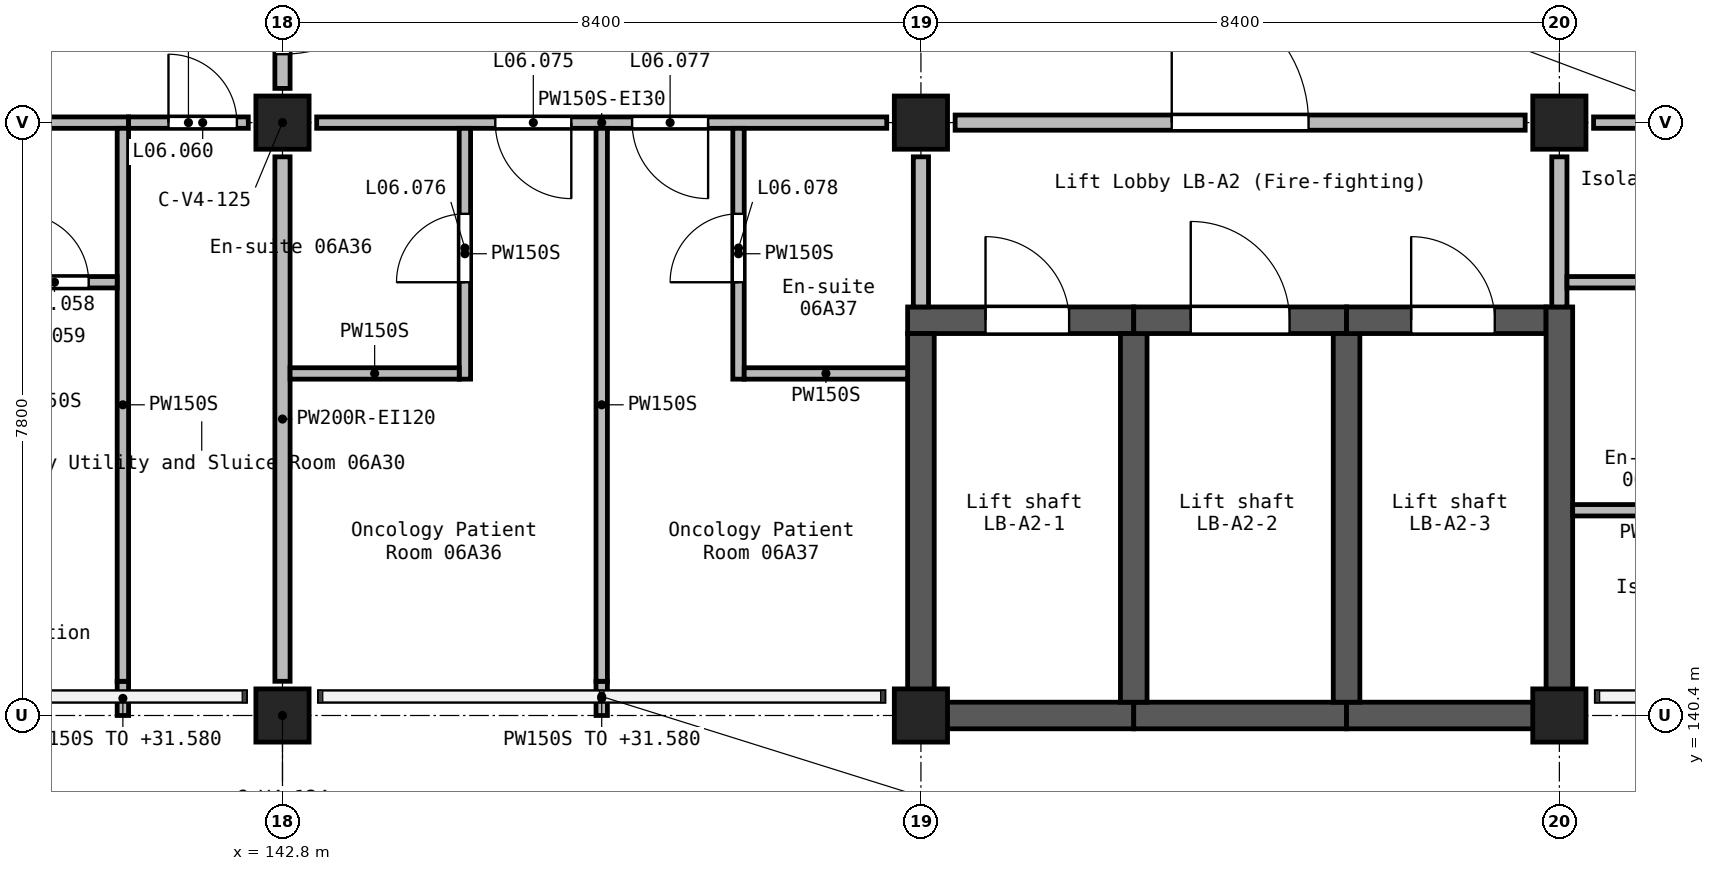
"""IFC4 building model, lengths in metres.
Left out: names, types, materials, properties, quantities, classifications, styles, units other than length and angle.
Written with IfcOpenShell. Run it as: python <this file> out.ifc"""

import sys

from ifc_helpers import new_model, si_unit, direction, frame, frame_2d, origin, origin_2d, place, context, subcontext, project, spatial, rectangle, extrude, element, fill, save


model = new_model("IFC4")
c1 = context("Model", 3, precision=1e-05, world=origin(), true_north=direction((0.0, 1.0)))
c2 = subcontext(c1, "Body", "Model", "MODEL_VIEW")
j1 = project(units=[si_unit("LENGTHUNIT", "METRE"), si_unit("PLANEANGLEUNIT", "RADIAN")], contexts=[c1])
p1 = place(None, origin())
s1 = spatial("IfcSite", under=j1, at=p1, CompositionType="ELEMENT")
p2 = place(p1, origin())
s2 = spatial("IfcBuilding", under=s1, at=p2, CompositionType="ELEMENT")
p3 = place(p2, frame((0.0, 0.0, 28.8)))
s3 = spatial("IfcBuildingStorey", under=s2, at=p3, CompositionType="ELEMENT", Elevation=28.8)
for number, where, z_axis, x_axis in (
    (1, (142.8, 140.4, 0.0), (0.0, 0.0, 1.0), (1.0, 0.0, 0.0)),
    (2, (142.8, 148.2, 0.0), (0.0, 0.0, 1.0), (1.0, 0.0, 0.0)),
    (3, (151.2, 140.4, 0.0), (0.0, 0.0, 1.0), (1.0, 0.0, 0.0)),
    (4, (151.2, 148.2, 0.0), (0.0, 0.0, 1.0), (1.0, 0.0, 0.0)),
    (5, (159.6, 140.4, 0.0), (0.0, 0.0, 1.0), (1.0, 0.0, 0.0)),
    (6, (159.6, 148.2, 0.0), (0.0, 0.0, 1.0), (1.0, 0.0, 0.0)),
):
    element("IfcColumn", number, at=place(p3, frame(where, z_axis=z_axis, x_axis=x_axis)), inside=s3, PredefinedType="COLUMN", context=c2, shape_type="SweptSolid", body=[
        extrude(rectangle(XDim=0.7, YDim=0.7, at=origin_2d()), origin(), (0.0, 0.0, 1.0), 3.9),
    ])
p4 = place(p3, frame((151.025, 145.6, 0.0), z_axis=(0.0, 0.0, 1.0), x_axis=(1.0, 0.0, 0.0)))
e7 = element("IfcWall", 7, at=p4, inside=s3, PredefinedType="SHEAR", context=c2, shape_type="SweptSolid", body=[
    extrude(rectangle(XDim=2.975, YDim=0.35, at=frame_2d((1.488, 0.0))), origin(), (0.0, 0.0, 1.0), 3.9),
])
p5 = place(p4, frame((1.025, 0.0, 0.0)))
e8 = element("IfcOpeningElement", 8, at=p5, cuts=e7, PredefinedType="OPENING", context=c2, shape_type="SweptSolid", body=[
    extrude(rectangle(XDim=1.1, YDim=2.1, at=frame_2d((0.55, 1.05))), frame((0.0, 0.185, 0.0), z_axis=(0.0, -1.0, 0.0), x_axis=(1.0, 0.0, 0.0)), (0.0, 0.0, 1.0), 0.37),
])
p6 = place(p3, frame((151.2, 140.225, 0.0), z_axis=(0.0, 0.0, 1.0), x_axis=(0.0, 1.0, 0.0)))
e9 = element("IfcWall", 9, at=p6, inside=s3, PredefinedType="SHEAR", context=c2, shape_type="SweptSolid", body=[
    extrude(rectangle(XDim=5.2, YDim=0.35, at=frame_2d((2.6, 0.0))), origin(), (0.0, 0.0, 1.0), 3.9),
])
p7 = place(p3, frame((151.375, 140.4, 0.0), z_axis=(0.0, 0.0, 1.0), x_axis=(1.0, 0.0, 0.0)))
e10 = element("IfcWall", 10, at=p7, inside=s3, PredefinedType="SHEAR", context=c2, shape_type="SweptSolid", body=[
    extrude(rectangle(XDim=2.625, YDim=0.35, at=frame_2d((1.312, 0.0))), origin(), (0.0, 0.0, 1.0), 3.9),
])
p8 = place(p3, frame((154.0, 140.4, 0.0), z_axis=(0.0, 0.0, 1.0), x_axis=(1.0, 0.0, 0.0)))
e11 = element("IfcWall", 11, at=p8, inside=s3, PredefinedType="SHEAR", context=c2, shape_type="SweptSolid", body=[
    extrude(rectangle(XDim=2.8, YDim=0.35, at=frame_2d((1.4, 0.0))), origin(), (0.0, 0.0, 1.0), 3.9),
])
p9 = place(p3, frame((154.0, 140.575, 0.0), z_axis=(0.0, 0.0, 1.0), x_axis=(0.0, 1.0, 0.0)))
e12 = element("IfcWall", 12, at=p9, inside=s3, PredefinedType="SHEAR", context=c2, shape_type="SweptSolid", body=[
    extrude(rectangle(XDim=4.85, YDim=0.35, at=frame_2d((2.425, 0.0))), origin(), (0.0, 0.0, 1.0), 3.9),
])
p10 = place(p3, frame((154.0, 145.6, 0.0), z_axis=(0.0, 0.0, 1.0), x_axis=(1.0, 0.0, 0.0)))
e13 = element("IfcWall", 13, at=p10, inside=s3, PredefinedType="SHEAR", context=c2, shape_type="SweptSolid", body=[
    extrude(rectangle(XDim=2.8, YDim=0.35, at=frame_2d((1.4, 0.0))), origin(), (0.0, 0.0, 1.0), 3.9),
])
p11 = place(p10, frame((0.75, 0.0, 0.0)))
e14 = element("IfcOpeningElement", 14, at=p11, cuts=e13, PredefinedType="OPENING", context=c2, shape_type="SweptSolid", body=[
    extrude(rectangle(XDim=1.3, YDim=2.1, at=frame_2d((0.65, 1.05))), frame((0.0, 0.185, 0.0), z_axis=(0.0, -1.0, 0.0), x_axis=(1.0, 0.0, 0.0)), (0.0, 0.0, 1.0), 0.37),
])
p12 = place(p3, frame((156.8, 140.4, 0.0), z_axis=(0.0, 0.0, 1.0), x_axis=(1.0, 0.0, 0.0)))
e15 = element("IfcWall", 15, at=p12, inside=s3, PredefinedType="SHEAR", context=c2, shape_type="SweptSolid", body=[
    extrude(rectangle(XDim=2.625, YDim=0.35, at=frame_2d((1.312, 0.0))), origin(), (0.0, 0.0, 1.0), 3.9),
])
p13 = place(p3, frame((156.8, 140.575, 0.0), z_axis=(0.0, 0.0, 1.0), x_axis=(0.0, 1.0, 0.0)))
e16 = element("IfcWall", 16, at=p13, inside=s3, PredefinedType="SHEAR", context=c2, shape_type="SweptSolid", body=[
    extrude(rectangle(XDim=4.85, YDim=0.35, at=frame_2d((2.425, 0.0))), origin(), (0.0, 0.0, 1.0), 3.9),
])
p14 = place(p3, frame((156.8, 145.6, 0.0), z_axis=(0.0, 0.0, 1.0), x_axis=(1.0, 0.0, 0.0)))
e17 = element("IfcWall", 17, at=p14, inside=s3, PredefinedType="SHEAR", context=c2, shape_type="SweptSolid", body=[
    extrude(rectangle(XDim=2.625, YDim=0.35, at=frame_2d((1.312, 0.0))), origin(), (0.0, 0.0, 1.0), 3.9),
])
p15 = place(p14, frame((0.85, 0.0, 0.0)))
e18 = element("IfcOpeningElement", 18, at=p15, cuts=e17, PredefinedType="OPENING", context=c2, shape_type="SweptSolid", body=[
    extrude(rectangle(XDim=1.1, YDim=2.1, at=frame_2d((0.55, 1.05))), frame((0.0, 0.185, 0.0), z_axis=(0.0, -1.0, 0.0), x_axis=(1.0, 0.0, 0.0)), (0.0, 0.0, 1.0), 0.37),
])
p16 = place(p3, frame((159.6, 140.225, 0.0), z_axis=(0.0, 0.0, 1.0), x_axis=(0.0, 1.0, 0.0)))
e19 = element("IfcWall", 19, at=p16, inside=s3, PredefinedType="SHEAR", context=c2, shape_type="SweptSolid", body=[
    extrude(rectangle(XDim=5.55, YDim=0.35, at=frame_2d((2.775, 0.0))), origin(), (0.0, 0.0, 1.0), 3.9),
])
p17 = place(p3, frame((142.8, 151.35, 0.0), z_axis=(0.0, 0.0, 1.0), x_axis=(0.0, -1.0, 0.0)))
e20 = element("IfcWall", 20, at=p17, inside=s3, PredefinedType="SOLIDWALL", context=c2, shape_type="SweptSolid", body=[
    extrude(rectangle(XDim=2.7, YDim=0.2, at=frame_2d((1.35, 0.0))), origin(), (0.0, 0.0, 1.0), 3.6),
])
p18 = place(p17, frame((0.45, 0.0, 0.0)))
e21 = element("IfcOpeningElement", 21, at=p18, cuts=e20, PredefinedType="OPENING", context=c2, shape_type="SweptSolid", body=[
    extrude(rectangle(XDim=1.8, YDim=2.1, at=frame_2d((0.9, 1.05))), frame((0.0, 0.11, 0.0), z_axis=(0.0, -1.0, 0.0), x_axis=(1.0, 0.0, 0.0)), (0.0, 0.0, 1.0), 0.22),
])
p19 = place(p3, frame((142.8, 147.75, 0.0), z_axis=(0.0, 0.0, 1.0), x_axis=(0.0, -1.0, 0.0)))
e22 = element("IfcWall", 22, at=p19, inside=s3, PredefinedType="SOLIDWALL", context=c2, shape_type="SweptSolid", body=[
    extrude(rectangle(XDim=6.9, YDim=0.2, at=frame_2d((3.45, 0.0))), origin(), (0.0, 0.0, 1.0), 3.6),
])
p20 = place(p3, frame((151.65, 148.2, 0.0), z_axis=(0.0, 0.0, 1.0), x_axis=(1.0, 0.0, 0.0)))
e23 = element("IfcWall", 23, at=p20, inside=s3, PredefinedType="SOLIDWALL", context=c2, shape_type="SweptSolid", body=[
    extrude(rectangle(XDim=7.5, YDim=0.2, at=frame_2d((3.75, 0.0))), origin(), (0.0, 0.0, 1.0), 3.6),
])
p21 = place(p20, frame((2.85, 0.0, 0.0)))
e24 = element("IfcOpeningElement", 24, at=p21, cuts=e23, PredefinedType="OPENING", context=c2, shape_type="SweptSolid", body=[
    extrude(rectangle(XDim=1.8, YDim=2.1, at=frame_2d((0.9, 1.05))), frame((0.0, 0.11, 0.0), z_axis=(0.0, -1.0, 0.0), x_axis=(1.0, 0.0, 0.0)), (0.0, 0.0, 1.0), 0.22),
])
for number, where, z_axis, x_axis in (
    (25, (151.2, 145.775, 0.0), (0.0, 0.0, 1.0), (0.0, 1.0, 0.0)),
    (26, (159.6, 145.775, 0.0), (0.0, 0.0, 1.0), (0.0, 1.0, 0.0)),
):
    element("IfcWall", number, at=place(p3, frame(where, z_axis=z_axis, x_axis=x_axis)), inside=s3, PredefinedType="SOLIDWALL", context=c2, shape_type="SweptSolid", body=[
        extrude(rectangle(XDim=1.975, YDim=0.2, at=frame_2d((0.988, 0.0))), origin(), (0.0, 0.0, 1.0), 3.6),
    ])
p22 = place(p3, frame((150.75, 148.2, 0.0), z_axis=(0.0, 0.0, 1.0), x_axis=(-1.0, 0.0, 0.0)))
e27 = element("IfcWall", 27, at=p22, inside=s3, PredefinedType="PARTITIONING", context=c2, shape_type="SweptSolid", body=[
    extrude(rectangle(XDim=7.5, YDim=0.15, at=frame_2d((3.75, 0.0))), origin(), (0.0, 0.0, 1.0), 3.6),
])
p23 = place(p22, frame((4.15, 0.0, 0.0)))
e28 = element("IfcOpeningElement", 28, at=p23, cuts=e27, PredefinedType="OPENING", context=c2, shape_type="SweptSolid", body=[
    extrude(rectangle(XDim=1.0, YDim=2.1, at=frame_2d((0.5, 1.05))), frame((0.0, 0.085, 0.0), z_axis=(0.0, -1.0, 0.0), x_axis=(1.0, 0.0, 0.0)), (0.0, 0.0, 1.0), 0.17),
])
p24 = place(p22, frame((2.35, 0.0, 0.0)))
e29 = element("IfcOpeningElement", 29, at=p24, cuts=e27, PredefinedType="OPENING", context=c2, shape_type="SweptSolid", body=[
    extrude(rectangle(XDim=1.0, YDim=2.1, at=frame_2d((0.5, 1.05))), frame((0.0, 0.085, 0.0), z_axis=(0.0, -1.0, 0.0), x_axis=(1.0, 0.0, 0.0)), (0.0, 0.0, 1.0), 0.17),
])
p25 = place(p3, frame((160.05, 148.2, 0.0), z_axis=(0.0, 0.0, 1.0), x_axis=(1.0, 0.0, 0.0)))
e30 = element("IfcWall", 30, at=p25, inside=s3, PredefinedType="PARTITIONING", context=c2, shape_type="SweptSolid", body=[
    extrude(rectangle(XDim=3.825, YDim=0.15, at=frame_2d((1.913, 0.0))), origin(), (0.0, 0.0, 1.0), 3.6),
])
p26 = place(p25, frame((1.2, 0.0, 0.0)))
e31 = element("IfcOpeningElement", 31, at=p26, cuts=e30, PredefinedType="OPENING", context=c2, shape_type="SweptSolid", body=[
    extrude(rectangle(XDim=0.9, YDim=2.1, at=frame_2d((0.45, 1.05))), frame((0.0, 0.085, 0.0), z_axis=(0.0, -1.0, 0.0), x_axis=(1.0, 0.0, 0.0)), (0.0, 0.0, 1.0), 0.17),
])
p27 = place(p3, frame((136.575, 148.2, 0.0), z_axis=(0.0, 0.0, 1.0), x_axis=(1.0, 0.0, 0.0)))
e32 = element("IfcWall", 32, at=p27, inside=s3, PredefinedType="PARTITIONING", context=c2, shape_type="SweptSolid", body=[
    extrude(rectangle(XDim=4.2, YDim=0.15, at=frame_2d((2.1, 0.0))), origin(), (0.0, 0.0, 1.0), 3.6),
])
p28 = place(p27, frame((1.575, 0.0, 0.0)))
e33 = element("IfcOpeningElement", 33, at=p28, cuts=e32, PredefinedType="OPENING", context=c2, shape_type="SweptSolid", body=[
    extrude(rectangle(XDim=0.9, YDim=2.1, at=frame_2d((0.45, 1.05))), frame((0.0, 0.085, 0.0), z_axis=(0.0, -1.0, 0.0), x_axis=(1.0, 0.0, 0.0)), (0.0, 0.0, 1.0), 0.17),
])
p29 = place(p3, frame((140.775, 148.2, 0.0), z_axis=(0.0, 0.0, 1.0), x_axis=(1.0, 0.0, 0.0)))
e34 = element("IfcWall", 34, at=p29, inside=s3, PredefinedType="PARTITIONING", context=c2, shape_type="SweptSolid", body=[
    extrude(rectangle(XDim=1.575, YDim=0.15, at=frame_2d((0.788, 0.0))), origin(), (0.0, 0.0, 1.0), 3.6),
])
p30 = place(p29, frame((0.525, 0.0, 0.0)))
e35 = element("IfcOpeningElement", 35, at=p30, cuts=e34, PredefinedType="OPENING", context=c2, shape_type="SweptSolid", body=[
    extrude(rectangle(XDim=0.9, YDim=2.1, at=frame_2d((0.45, 1.05))), frame((0.0, 0.085, 0.0), z_axis=(0.0, -1.0, 0.0), x_axis=(1.0, 0.0, 0.0)), (0.0, 0.0, 1.0), 0.17),
])
p31 = place(p3, frame((140.7, 140.4, 0.0), z_axis=(0.0, 0.0, 1.0), x_axis=(0.0, 1.0, 0.0)))
e36 = element("IfcWall", 36, at=p31, inside=s3, PredefinedType="PARTITIONING", context=c2, shape_type="SweptSolid", body=[
    extrude(rectangle(XDim=0.45, YDim=0.15, at=frame_2d((0.225, 0.0))), origin(), (0.0, 0.0, 1.0), 2.78),
])
p32 = place(p3, frame((140.7, 140.85, 0.0), z_axis=(0.0, 0.0, 1.0), x_axis=(0.0, 1.0, 0.0)))
e37 = element("IfcWall", 37, at=p32, inside=s3, PredefinedType="PARTITIONING", context=c2, shape_type="SweptSolid", body=[
    extrude(rectangle(XDim=7.275, YDim=0.15, at=frame_2d((3.637, 0.0))), origin(), (0.0, 0.0, 1.0), 3.6),
])
p33 = place(p3, frame((147.0, 140.4, 0.0), z_axis=(0.0, 0.0, 1.0), x_axis=(0.0, 1.0, 0.0)))
e38 = element("IfcWall", 38, at=p33, inside=s3, PredefinedType="PARTITIONING", context=c2, shape_type="SweptSolid", body=[
    extrude(rectangle(XDim=0.45, YDim=0.15, at=frame_2d((0.225, 0.0))), origin(), (0.0, 0.0, 1.0), 2.78),
])
p34 = place(p3, frame((147.0, 140.85, 0.0), z_axis=(0.0, 0.0, 1.0), x_axis=(0.0, 1.0, 0.0)))
e39 = element("IfcWall", 39, at=p34, inside=s3, PredefinedType="PARTITIONING", context=c2, shape_type="SweptSolid", body=[
    extrude(rectangle(XDim=7.275, YDim=0.15, at=frame_2d((3.637, 0.0))), origin(), (0.0, 0.0, 1.0), 3.6),
])
p35 = place(p3, frame((159.7, 146.1, 0.0), z_axis=(0.0, 0.0, 1.0), x_axis=(1.0, 0.0, 0.0)))
e40 = element("IfcWall", 40, at=p35, inside=s3, PredefinedType="PARTITIONING", context=c2, shape_type="SweptSolid", body=[
    extrude(rectangle(XDim=4.025, YDim=0.15, at=frame_2d((2.013, 0.0))), origin(), (0.0, 0.0, 1.0), 3.6),
])
p36 = place(p35, frame((2.75, 0.0, 0.0)))
e41 = element("IfcOpeningElement", 41, at=p36, cuts=e40, PredefinedType="OPENING", context=c2, shape_type="SweptSolid", body=[
    extrude(rectangle(XDim=0.9, YDim=2.1, at=frame_2d((0.45, 1.05))), frame((0.0, 0.085, 0.0), z_axis=(0.0, -1.0, 0.0), x_axis=(1.0, 0.0, 0.0)), (0.0, 0.0, 1.0), 0.17),
])
p37 = place(p3, frame((136.425, 146.1, 0.0), z_axis=(0.0, 0.0, 1.0), x_axis=(1.0, 0.0, 0.0)))
e42 = element("IfcWall", 42, at=p37, inside=s3, PredefinedType="PARTITIONING", context=c2, shape_type="SweptSolid", body=[
    extrude(rectangle(XDim=4.2, YDim=0.15, at=frame_2d((2.1, 0.0))), origin(), (0.0, 0.0, 1.0), 3.6),
])
p38 = place(p37, frame((2.925, 0.0, 0.0)))
e43 = element("IfcOpeningElement", 43, at=p38, cuts=e42, PredefinedType="OPENING", context=c2, shape_type="SweptSolid", body=[
    extrude(rectangle(XDim=0.9, YDim=2.1, at=frame_2d((0.45, 1.05))), frame((0.0, 0.085, 0.0), z_axis=(0.0, -1.0, 0.0), x_axis=(1.0, 0.0, 0.0)), (0.0, 0.0, 1.0), 0.17),
])
p39 = place(p3, frame((145.2, 144.825, 0.0), z_axis=(0.0, 0.0, 1.0), x_axis=(0.0, 1.0, 0.0)))
e44 = element("IfcWall", 44, at=p39, inside=s3, PredefinedType="PARTITIONING", context=c2, shape_type="SweptSolid", body=[
    extrude(rectangle(XDim=3.3, YDim=0.15, at=frame_2d((1.65, 0.0))), origin(), (0.0, 0.0, 1.0), 3.6),
])
p40 = place(p39, frame((1.275, 0.0, 0.0)))
e45 = element("IfcOpeningElement", 45, at=p40, cuts=e44, PredefinedType="OPENING", context=c2, shape_type="SweptSolid", body=[
    extrude(rectangle(XDim=0.9, YDim=2.1, at=frame_2d((0.45, 1.05))), frame((0.0, 0.085, 0.0), z_axis=(0.0, -1.0, 0.0), x_axis=(1.0, 0.0, 0.0)), (0.0, 0.0, 1.0), 0.17),
])
p41 = place(p3, frame((148.8, 144.825, 0.0), z_axis=(0.0, 0.0, 1.0), x_axis=(0.0, 1.0, 0.0)))
e46 = element("IfcWall", 46, at=p41, inside=s3, PredefinedType="PARTITIONING", context=c2, shape_type="SweptSolid", body=[
    extrude(rectangle(XDim=3.3, YDim=0.15, at=frame_2d((1.65, 0.0))), origin(), (0.0, 0.0, 1.0), 3.6),
])
p42 = place(p41, frame((1.275, 0.0, 0.0)))
e47 = element("IfcOpeningElement", 47, at=p42, cuts=e46, PredefinedType="OPENING", context=c2, shape_type="SweptSolid", body=[
    extrude(rectangle(XDim=0.9, YDim=2.1, at=frame_2d((0.45, 1.05))), frame((0.0, 0.085, 0.0), z_axis=(0.0, -1.0, 0.0), x_axis=(1.0, 0.0, 0.0)), (0.0, 0.0, 1.0), 0.17),
])
p43 = place(p3, frame((159.775, 143.1, 0.0), z_axis=(0.0, 0.0, 1.0), x_axis=(1.0, 0.0, 0.0)))
e48 = element("IfcWall", 48, at=p43, inside=s3, PredefinedType="PARTITIONING", context=c2, shape_type="SweptSolid", body=[
    extrude(rectangle(XDim=2.15, YDim=0.15, at=frame_2d((1.075, 0.0))), origin(), (0.0, 0.0, 1.0), 3.6),
])
p44 = place(p3, frame((142.9, 144.9, 0.0), z_axis=(0.0, 0.0, 1.0), x_axis=(1.0, 0.0, 0.0)))
e49 = element("IfcWall", 49, at=p44, inside=s3, PredefinedType="PARTITIONING", context=c2, shape_type="SweptSolid", body=[
    extrude(rectangle(XDim=2.225, YDim=0.15, at=frame_2d((1.113, 0.0))), origin(), (0.0, 0.0, 1.0), 3.6),
])
p45 = place(p3, frame((148.875, 144.9, 0.0), z_axis=(0.0, 0.0, 1.0), x_axis=(1.0, 0.0, 0.0)))
e50 = element("IfcWall", 50, at=p45, inside=s3, PredefinedType="PARTITIONING", context=c2, shape_type="SweptSolid", body=[
    extrude(rectangle(XDim=2.15, YDim=0.15, at=frame_2d((1.075, 0.0))), origin(), (0.0, 0.0, 1.0), 3.6),
])
p46 = place(p18, origin())
e51 = element("IfcDoor", 51, at=p46, inside=s3, OperationType="DOUBLE_DOOR_SINGLE_SWING", PredefinedType="DOOR", context=c2, shape_type="SweptSolid", body=[
    extrude(rectangle(XDim=1.8, YDim=2.1, at=frame_2d((0.9, 1.05))), frame((0.0, 0.025, 0.0), z_axis=(0.0, -1.0, 0.0), x_axis=(1.0, 0.0, 0.0)), (0.0, 0.0, 1.0), 0.05),
])
fill(e21, e51)
p47 = place(p38, frame((0.9, 0.0, 0.0), z_axis=(0.0, 0.0, 1.0), x_axis=(-1.0, 0.0, 0.0)))
e52 = element("IfcDoor", 52, at=p47, inside=s3, OperationType="SINGLE_SWING_LEFT", PredefinedType="DOOR", context=c2, shape_type="SweptSolid", body=[
    extrude(rectangle(XDim=0.9, YDim=2.1, at=frame_2d((0.45, 1.05))), frame((0.0, 0.025, 0.0), z_axis=(0.0, -1.0, 0.0), x_axis=(1.0, 0.0, 0.0)), (0.0, 0.0, 1.0), 0.05),
])
fill(e43, e52)
p48 = place(p30, frame((0.9, 0.0, 0.0), z_axis=(0.0, 0.0, 1.0), x_axis=(-1.0, 0.0, 0.0)))
e53 = element("IfcDoor", 53, at=p48, inside=s3, OperationType="SINGLE_SWING_LEFT", PredefinedType="DOOR", context=c2, shape_type="SweptSolid", body=[
    extrude(rectangle(XDim=0.9, YDim=2.1, at=frame_2d((0.45, 1.05))), frame((0.0, 0.025, 0.0), z_axis=(0.0, -1.0, 0.0), x_axis=(1.0, 0.0, 0.0)), (0.0, 0.0, 1.0), 0.05),
])
fill(e35, e53)
p49 = place(p23, origin())
e54 = element("IfcDoor", 54, at=p49, inside=s3, OperationType="SINGLE_SWING_RIGHT", PredefinedType="DOOR", context=c2, shape_type="SweptSolid", body=[
    extrude(rectangle(XDim=1.0, YDim=2.1, at=frame_2d((0.5, 1.05))), frame((0.0, 0.025, 0.0), z_axis=(0.0, -1.0, 0.0), x_axis=(1.0, 0.0, 0.0)), (0.0, 0.0, 1.0), 0.05),
])
fill(e28, e54)
p50 = place(p40, origin())
e55 = element("IfcDoor", 55, at=p50, inside=s3, OperationType="SINGLE_SWING_RIGHT", PredefinedType="DOOR", context=c2, shape_type="SweptSolid", body=[
    extrude(rectangle(XDim=0.9, YDim=2.1, at=frame_2d((0.45, 1.05))), frame((0.0, 0.025, 0.0), z_axis=(0.0, -1.0, 0.0), x_axis=(1.0, 0.0, 0.0)), (0.0, 0.0, 1.0), 0.05),
])
fill(e45, e55)
p51 = place(p24, origin())
e56 = element("IfcDoor", 56, at=p51, inside=s3, OperationType="SINGLE_SWING_LEFT", PredefinedType="DOOR", context=c2, shape_type="SweptSolid", body=[
    extrude(rectangle(XDim=1.0, YDim=2.1, at=frame_2d((0.5, 1.05))), frame((0.0, 0.025, 0.0), z_axis=(0.0, -1.0, 0.0), x_axis=(1.0, 0.0, 0.0)), (0.0, 0.0, 1.0), 0.05),
])
fill(e29, e56)
p52 = place(p42, frame((0.9, 0.0, 0.0), z_axis=(0.0, 0.0, 1.0), x_axis=(-1.0, 0.0, 0.0)))
e57 = element("IfcDoor", 57, at=p52, inside=s3, OperationType="SINGLE_SWING_LEFT", PredefinedType="DOOR", context=c2, shape_type="SweptSolid", body=[
    extrude(rectangle(XDim=0.9, YDim=2.1, at=frame_2d((0.45, 1.05))), frame((0.0, 0.025, 0.0), z_axis=(0.0, -1.0, 0.0), x_axis=(1.0, 0.0, 0.0)), (0.0, 0.0, 1.0), 0.05),
])
fill(e47, e57)
p53 = place(p21, frame((1.8, 0.0, 0.0), z_axis=(0.0, 0.0, 1.0), x_axis=(-1.0, 0.0, 0.0)))
e58 = element("IfcDoor", 58, at=p53, inside=s3, OperationType="DOUBLE_DOOR_SINGLE_SWING", PredefinedType="DOOR", context=c2, shape_type="SweptSolid", body=[
    extrude(rectangle(XDim=1.8, YDim=2.1, at=frame_2d((0.9, 1.05))), frame((0.0, 0.025, 0.0), z_axis=(0.0, -1.0, 0.0), x_axis=(1.0, 0.0, 0.0)), (0.0, 0.0, 1.0), 0.05),
])
fill(e24, e58)
p54 = place(p5, origin())
e59 = element("IfcDoor", 59, at=p54, inside=s3, OperationType="DOUBLE_DOOR_SLIDING", PredefinedType="DOOR", context=c2, shape_type="SweptSolid", body=[
    extrude(rectangle(XDim=1.1, YDim=2.1, at=frame_2d((0.55, 1.05))), frame((0.0, 0.025, 0.0), z_axis=(0.0, -1.0, 0.0), x_axis=(1.0, 0.0, 0.0)), (0.0, 0.0, 1.0), 0.05),
])
fill(e8, e59)
p55 = place(p11, origin())
e60 = element("IfcDoor", 60, at=p55, inside=s3, OperationType="DOUBLE_DOOR_SLIDING", PredefinedType="DOOR", context=c2, shape_type="SweptSolid", body=[
    extrude(rectangle(XDim=1.3, YDim=2.1, at=frame_2d((0.65, 1.05))), frame((0.0, 0.025, 0.0), z_axis=(0.0, -1.0, 0.0), x_axis=(1.0, 0.0, 0.0)), (0.0, 0.0, 1.0), 0.05),
])
fill(e14, e60)
p56 = place(p15, origin())
e61 = element("IfcDoor", 61, at=p56, inside=s3, OperationType="DOUBLE_DOOR_SLIDING", PredefinedType="DOOR", context=c2, shape_type="SweptSolid", body=[
    extrude(rectangle(XDim=1.1, YDim=2.1, at=frame_2d((0.55, 1.05))), frame((0.0, 0.025, 0.0), z_axis=(0.0, -1.0, 0.0), x_axis=(1.0, 0.0, 0.0)), (0.0, 0.0, 1.0), 0.05),
])
fill(e18, e61)
save(model, sys.argv[1])
